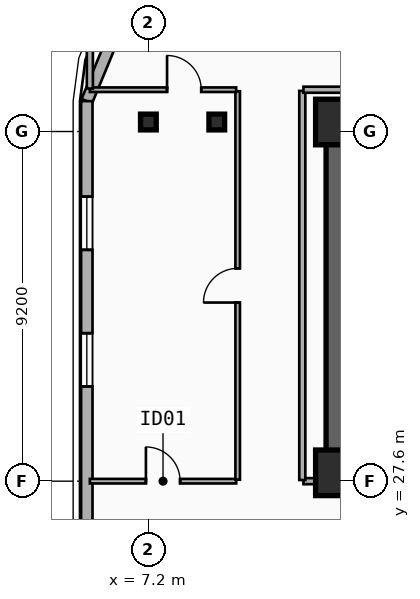
"""IFC4 building model, lengths in metres.
Left out: names, types, materials, properties, quantities, classifications, styles, units other than length and angle.
Written with IfcOpenShell. Run it as: python <this file> out.ifc"""

import sys

from ifc_helpers import new_model, si_unit, direction, frame, frame_2d, origin, origin_2d, place, context, subcontext, project, spatial, rectangle, i_section, extrude, element, fill, save


model = new_model("IFC4")
c1 = context("Model", 3, precision=1e-05, world=origin(), true_north=direction((0.0, 1.0)))
c2 = subcontext(c1, "Body", "Model", "MODEL_VIEW")
j1 = project(units=[si_unit("LENGTHUNIT", "METRE"), si_unit("PLANEANGLEUNIT", "RADIAN")], contexts=[c1])
p1 = place(None, origin())
s1 = spatial("IfcSite", under=j1, at=p1, CompositionType="ELEMENT")
p2 = place(p1, origin())
s2 = spatial("IfcBuilding", under=s1, at=p2, CompositionType="ELEMENT")
p3 = place(p2, frame((0.0, 0.0, 148.35)))
s3 = spatial("IfcBuildingStorey", under=s2, at=p3, CompositionType="ELEMENT", Elevation=148.35)
p4 = place(p3, frame((12.15, 37.05, 0.0), z_axis=(0.0, 0.0, 1.0), x_axis=(1.0, 0.0, 0.0)))
e1 = element("IfcWall", 1, at=p4, inside=s3, PredefinedType="SHEAR", context=c2, shape_type="SweptSolid", body=[
    extrude(rectangle(XDim=33.23, YDim=0.55, at=frame_2d((16.615, 0.0))), origin(), (0.0, 0.0, 1.0), 3.55),
])
p5 = place(p3, frame((21.18, 27.82, 0.0), z_axis=(0.0, 0.0, 1.0), x_axis=(-1.0, 0.0, 0.0)))
e2 = element("IfcWall", 2, at=p5, inside=s3, PredefinedType="SHEAR", context=c2, shape_type="SweptSolid", body=[
    extrude(rectangle(XDim=9.03, YDim=0.55, at=frame_2d((4.515, 0.0))), origin(), (0.0, 0.0, 1.0), 3.55),
])
p6 = place(p5, frame((2.68, 0.0, 0.0)))
e3 = element("IfcOpeningElement", 3, at=p6, cuts=e2, PredefinedType="OPENING", context=c2, shape_type="SweptSolid", body=[
    extrude(rectangle(XDim=1.1, YDim=2.15, at=frame_2d((0.55, 1.075))), frame((0.0, 0.285, 0.0), z_axis=(0.0, -1.0, 0.0), x_axis=(1.0, 0.0, 0.0)), (0.0, 0.0, 1.0), 0.57),
])
p7 = place(p3, frame((12.15, 28.095, 0.0), z_axis=(0.0, 0.0, 1.0), x_axis=(0.0, 1.0, 0.0)))
e4 = element("IfcWall", 4, at=p7, inside=s3, PredefinedType="SHEAR", context=c2, shape_type="SweptSolid", body=[
    extrude(rectangle(XDim=8.68, YDim=0.55, at=frame_2d((4.34, 0.0))), origin(), (0.0, 0.0, 1.0), 3.55),
])
for number, where, z_axis, x_axis in (
    (5, (12.2, 27.82, 0.0), (0.0, 0.0, 1.0), (1.0, 0.0, 0.0)),
    (6, (12.2, 37.05, 0.0), (0.0, 0.0, 1.0), (1.0, 0.0, 0.0)),
):
    element("IfcColumn", number, at=place(p3, frame(where, z_axis=z_axis, x_axis=x_axis)), inside=s3, PredefinedType="COLUMN", context=c2, shape_type="SweptSolid", body=[
        extrude(rectangle(XDim=1.2, YDim=1.2, at=origin_2d()), origin(), (0.0, 0.0, 1.0), 3.55),
    ])
for number, where, z_axis, x_axis in (
    (7, (9.0, 37.05, 0.0), (0.0, 0.0, 1.0), (1.0, 0.0, 0.0)),
    (8, (7.2, 37.05, 0.0), (0.0, 0.0, 1.0), (1.0, 0.0, 0.0)),
):
    element("IfcColumn", number, at=place(p3, frame(where, z_axis=z_axis, x_axis=x_axis)), inside=s3, PredefinedType="COLUMN", context=c2, shape_type="SweptSolid", body=[
        extrude(i_section(OverallWidth=0.413, OverallDepth=0.415, WebThickness=0.03, FlangeThickness=0.047, FilletRadius=0.015, at=origin_2d()), origin(), (0.0, 0.0, 1.0), 3.55),
    ])
p8 = place(p3, frame((5.58, 37.6, 0.0), z_axis=(0.0, 0.0, 1.0), x_axis=(0.382636798336, 0.92389884758, 0.0)))
e9 = element("IfcWall", 9, at=p8, inside=s3, PredefinedType="SOLIDWALL", context=c2, shape_type="SweptSolid", body=[
    extrude(rectangle(XDim=3.077, YDim=0.3, at=frame_2d((1.538, 0.0))), origin(), (0.0, 0.0, 1.0), 3.29),
])
p9 = place(p3, frame((5.58, 14.6, 0.0), z_axis=(0.0, 0.0, 1.0), x_axis=(0.0, 1.0, 0.0)))
e10 = element("IfcWall", 10, at=p9, inside=s3, PredefinedType="SOLIDWALL", context=c2, shape_type="SweptSolid", body=[
    extrude(rectangle(XDim=23.0, YDim=0.3, at=frame_2d((11.5, 0.0))), origin(), (0.0, 0.0, 1.0), 3.29),
])
p10 = place(p9, frame((15.493, 0.0, 0.34)))
e11 = element("IfcOpeningElement", 11, at=p10, cuts=e10, PredefinedType="OPENING", context=c2, shape_type="SweptSolid", body=[
    extrude(rectangle(XDim=1.4, YDim=2.1, at=frame_2d((0.7, 1.05))), frame((0.0, 0.16, 0.0), z_axis=(0.0, -1.0, 0.0), x_axis=(1.0, 0.0, 0.0)), (0.0, 0.0, 1.0), 0.32),
])
p11 = place(p9, frame((19.087, 0.0, 0.34)))
e12 = element("IfcOpeningElement", 12, at=p11, cuts=e10, PredefinedType="OPENING", context=c2, shape_type="SweptSolid", body=[
    extrude(rectangle(XDim=1.4, YDim=2.1, at=frame_2d((0.7, 1.05))), frame((0.0, 0.16, 0.0), z_axis=(0.0, -1.0, 0.0), x_axis=(1.0, 0.0, 0.0)), (0.0, 0.0, 1.0), 0.32),
])
p12 = place(p9, frame((2.83, 0.0, 0.34)))
e13 = element("IfcOpeningElement", 13, at=p12, cuts=e10, PredefinedType="OPENING", context=c2, shape_type="SweptSolid", body=[
    extrude(rectangle(XDim=1.4, YDim=2.1, at=frame_2d((0.7, 1.05))), frame((0.0, 0.16, 0.0), z_axis=(0.0, -1.0, 0.0), x_axis=(1.0, 0.0, 0.0)), (0.0, 0.0, 1.0), 0.32),
])
p13 = place(p9, frame((6.74, 0.0, 0.34)))
e14 = element("IfcOpeningElement", 14, at=p13, cuts=e10, PredefinedType="OPENING", context=c2, shape_type="SweptSolid", body=[
    extrude(rectangle(XDim=1.4, YDim=2.1, at=frame_2d((0.7, 1.05))), frame((0.0, 0.16, 0.0), z_axis=(0.0, -1.0, 0.0), x_axis=(1.0, 0.0, 0.0)), (0.0, 0.0, 1.0), 0.32),
])
p14 = place(p3, frame((5.66, 27.6, 0.0), z_axis=(0.0, 0.0, 1.0), x_axis=(1.0, 0.0, 0.0)))
e15 = element("IfcWall", 15, at=p14, inside=s3, PredefinedType="PARTITIONING", context=c2, shape_type="SweptSolid", body=[
    extrude(rectangle(XDim=3.85, YDim=0.12, at=frame_2d((1.925, 0.0))), origin(), (0.0, 0.0, 1.0), 2.62),
])
p15 = place(p14, frame((1.475, 0.0, 0.0)))
e16 = element("IfcOpeningElement", 16, at=p15, cuts=e15, PredefinedType="OPENING", context=c2, shape_type="SweptSolid", body=[
    extrude(rectangle(XDim=0.9, YDim=2.1, at=frame_2d((0.45, 1.05))), frame((0.0, 0.07, 0.0), z_axis=(0.0, -1.0, 0.0), x_axis=(1.0, 0.0, 0.0)), (0.0, 0.0, 1.0), 0.14),
])
p16 = place(p3, frame((9.55, 27.64, 0.0), z_axis=(0.0, 0.0, 1.0), x_axis=(0.0, 1.0, 0.0)))
e17 = element("IfcWall", 17, at=p16, inside=s3, PredefinedType="PARTITIONING", context=c2, shape_type="SweptSolid", body=[
    extrude(rectangle(XDim=10.22, YDim=0.12, at=frame_2d((5.11, 0.0))), origin(), (0.0, 0.0, 1.0), 2.77),
])
p17 = place(p16, frame((4.66, 0.0, 0.0)))
e18 = element("IfcOpeningElement", 18, at=p17, cuts=e17, PredefinedType="OPENING", context=c2, shape_type="SweptSolid", body=[
    extrude(rectangle(XDim=0.9, YDim=2.1, at=frame_2d((0.45, 1.05))), frame((0.0, 0.07, 0.0), z_axis=(0.0, -1.0, 0.0), x_axis=(1.0, 0.0, 0.0)), (0.0, 0.0, 1.0), 0.14),
])
p18 = place(p3, frame((5.66, 37.9, 0.0), z_axis=(0.0, 0.0, 1.0), x_axis=(1.0, 0.0, 0.0)))
e19 = element("IfcWall", 19, at=p18, inside=s3, PredefinedType="PARTITIONING", context=c2, shape_type="SweptSolid", body=[
    extrude(rectangle(XDim=3.85, YDim=0.12, at=frame_2d((1.925, 0.0))), origin(), (0.0, 0.0, 1.0), 3.29),
])
p19 = place(p18, frame((2.031, 0.0, 0.0)))
e20 = element("IfcOpeningElement", 20, at=p19, cuts=e19, PredefinedType="OPENING", context=c2, shape_type="SweptSolid", body=[
    extrude(rectangle(XDim=0.9, YDim=2.1, at=frame_2d((0.45, 1.05))), frame((0.0, 0.07, 0.0), z_axis=(0.0, -1.0, 0.0), x_axis=(1.0, 0.0, 0.0)), (0.0, 0.0, 1.0), 0.14),
])
p20 = place(p3, frame((11.28, 27.6, 0.0), z_axis=(0.0, 0.0, 1.0), x_axis=(1.0, 0.0, 0.0)))
e21 = element("IfcWall", 21, at=p20, inside=s3, PredefinedType="PARTITIONING", context=c2, shape_type="SweptSolid", body=[
    extrude(rectangle(XDim=0.84, YDim=0.16, at=frame_2d((0.42, 0.0))), origin(), (0.0, 0.0, 1.0), 2.36),
])
p21 = place(p3, frame((11.25, 27.63, 0.0), z_axis=(0.0, 0.0, 1.0), x_axis=(0.0, 1.0, 0.0)))
e22 = element("IfcWall", 22, at=p21, inside=s3, PredefinedType="PARTITIONING", context=c2, shape_type="SweptSolid", body=[
    extrude(rectangle(XDim=10.24, YDim=0.16, at=frame_2d((5.12, 0.0))), origin(), (0.0, 0.0, 1.0), 2.77),
])
p22 = place(p3, frame((11.28, 37.9, 0.0), z_axis=(0.0, 0.0, 1.0), x_axis=(1.0, 0.0, 0.0)))
e23 = element("IfcWall", 23, at=p22, inside=s3, PredefinedType="PARTITIONING", context=c2, shape_type="SweptSolid", body=[
    extrude(rectangle(XDim=35.04, YDim=0.16, at=frame_2d((17.52, 0.0))), origin(), (0.0, 0.0, 1.0), 3.29),
])
p23 = place(p3, frame((5.66, 37.93, 0.0), z_axis=(0.0, 0.0, 1.0), x_axis=(0.0, 1.0, 0.0)))
e24 = element("IfcWall", 24, at=p23, inside=s3, PredefinedType="PARTITIONING", context=c2, shape_type="SweptSolid", body=[
    extrude(rectangle(XDim=1.44, YDim=0.16, at=frame_2d((0.72, 0.0))), origin(), (0.0, 0.0, 1.0), 3.29),
])
p24 = place(p10, origin())
e25 = element("IfcWindow", 25, at=p24, inside=s3, PartitioningType="SINGLE_PANEL", PredefinedType="WINDOW", context=c2, shape_type="SweptSolid", body=[
    extrude(rectangle(XDim=1.4, YDim=2.1, at=frame_2d((0.7, 1.05))), frame((0.0, 0.03, 0.0), z_axis=(0.0, -1.0, 0.0), x_axis=(1.0, 0.0, 0.0)), (0.0, 0.0, 1.0), 0.06),
])
fill(e11, e25)
p25 = place(p11, origin())
e26 = element("IfcWindow", 26, at=p25, inside=s3, PartitioningType="SINGLE_PANEL", PredefinedType="WINDOW", context=c2, shape_type="SweptSolid", body=[
    extrude(rectangle(XDim=1.4, YDim=2.1, at=frame_2d((0.7, 1.05))), frame((0.0, 0.03, 0.0), z_axis=(0.0, -1.0, 0.0), x_axis=(1.0, 0.0, 0.0)), (0.0, 0.0, 1.0), 0.06),
])
fill(e12, e26)
p26 = place(p15, origin())
e27 = element("IfcDoor", 27, at=p26, inside=s3, OperationType="SINGLE_SWING_LEFT", PredefinedType="DOOR", context=c2, shape_type="SweptSolid", body=[
    extrude(rectangle(XDim=0.9, YDim=2.1, at=frame_2d((0.45, 1.05))), frame((0.0, 0.025, 0.0), z_axis=(0.0, -1.0, 0.0), x_axis=(1.0, 0.0, 0.0)), (0.0, 0.0, 1.0), 0.05),
])
fill(e16, e27)
p27 = place(p17, origin())
e28 = element("IfcDoor", 28, at=p27, inside=s3, OperationType="SINGLE_SWING_LEFT", PredefinedType="DOOR", context=c2, shape_type="SweptSolid", body=[
    extrude(rectangle(XDim=0.9, YDim=2.1, at=frame_2d((0.45, 1.05))), frame((0.0, 0.025, 0.0), z_axis=(0.0, -1.0, 0.0), x_axis=(1.0, 0.0, 0.0)), (0.0, 0.0, 1.0), 0.05),
])
fill(e18, e28)
p28 = place(p19, origin())
e29 = element("IfcDoor", 29, at=p28, inside=s3, OperationType="SINGLE_SWING_LEFT", PredefinedType="DOOR", context=c2, shape_type="SweptSolid", body=[
    extrude(rectangle(XDim=0.9, YDim=2.1, at=frame_2d((0.45, 1.05))), frame((0.0, 0.025, 0.0), z_axis=(0.0, -1.0, 0.0), x_axis=(1.0, 0.0, 0.0)), (0.0, 0.0, 1.0), 0.05),
])
fill(e20, e29)
save(model, sys.argv[1])
